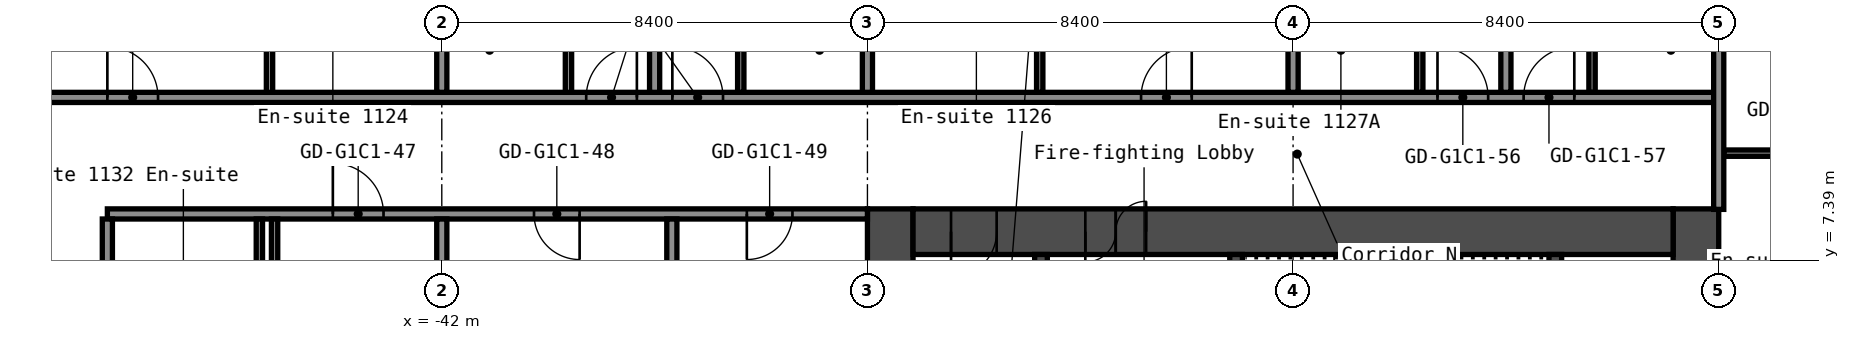
"""IFC4 building model, lengths in metres.
Left out: names, types, materials, properties, quantities, classifications, styles, units other than length and angle.
Written with IfcOpenShell. Run it as: python <this file> out.ifc"""

import sys

from ifc_helpers import new_model, si_unit, direction, frame, frame_2d, origin, place, context, subcontext, project, spatial, rectangle, extrude, element, fill, save


model = new_model("IFC4")
c1 = context("Model", 3, precision=1e-05, world=origin(), true_north=direction((0.0, 1.0)))
c2 = subcontext(c1, "Body", "Model", "MODEL_VIEW")
j1 = project(units=[si_unit("LENGTHUNIT", "METRE"), si_unit("PLANEANGLEUNIT", "RADIAN")], contexts=[c1])
p1 = place(None, origin())
s1 = spatial("IfcSite", under=j1, at=p1, CompositionType="ELEMENT")
p2 = place(p1, origin())
s2 = spatial("IfcBuilding", under=s1, at=p2, CompositionType="ELEMENT")
p3 = place(p2, frame((0.0, 0.0, 42.2)))
s3 = spatial("IfcBuildingStorey", under=s2, at=p3, CompositionType="ELEMENT", Elevation=42.2)
p4 = place(p3, frame((-17.25, -8.4, 0.0), z_axis=(0.0, 0.0, 1.0), x_axis=(0.0, 1.0, 0.0)))
e1 = element("IfcWall", 1, at=p4, inside=s3, PredefinedType="SHEAR", context=c2, shape_type="SweptSolid", body=[
    extrude(rectangle(XDim=16.8, YDim=0.9, at=frame_2d((8.4, 0.0))), origin(), (0.0, 0.0, 1.0), 2.8),
])
p5 = place(p4, frame((12.75, 0.0, 0.0)))
e2 = element("IfcOpeningElement", 2, at=p5, cuts=e1, PredefinedType="OPENING", context=c2, shape_type="SweptSolid", body=[
    extrude(rectangle(XDim=1.2, YDim=2.1, at=frame_2d((0.6, 1.05))), frame((0.0, 0.46, 0.0), z_axis=(0.0, -1.0, 0.0), x_axis=(1.0, 0.0, 0.0)), (0.0, 0.0, 1.0), 0.92),
])
p6 = place(p4, frame((2.85, 0.0, 0.0)))
e3 = element("IfcOpeningElement", 3, at=p6, cuts=e1, PredefinedType="OPENING", context=c2, shape_type="SweptSolid", body=[
    extrude(rectangle(XDim=1.2, YDim=2.1, at=frame_2d((0.6, 1.05))), frame((0.0, 0.46, 0.0), z_axis=(0.0, -1.0, 0.0), x_axis=(1.0, 0.0, 0.0)), (0.0, 0.0, 1.0), 0.92),
])
p7 = place(p3, frame((-33.15, -8.4, 0.0), z_axis=(0.0, 0.0, 1.0), x_axis=(0.0, 1.0, 0.0)))
e4 = element("IfcWall", 4, at=p7, inside=s3, PredefinedType="SHEAR", context=c2, shape_type="SweptSolid", body=[
    extrude(rectangle(XDim=16.8, YDim=0.9, at=frame_2d((8.4, 0.0))), origin(), (0.0, 0.0, 1.0), 2.8),
])
p8 = place(p3, frame((-32.7, 7.95, 0.0), z_axis=(0.0, 0.0, 1.0), x_axis=(1.0, 0.0, 0.0)))
e5 = element("IfcWall", 5, at=p8, inside=s3, PredefinedType="SHEAR", context=c2, shape_type="SweptSolid", body=[
    extrude(rectangle(XDim=15.0, YDim=0.9, at=frame_2d((7.5, 0.0))), origin(), (0.0, 0.0, 1.0), 2.8),
])
p9 = place(p8, frame((3.4, 0.0, 0.0)))
e6 = element("IfcOpeningElement", 6, at=p9, cuts=e5, PredefinedType="OPENING", context=c2, shape_type="SweptSolid", body=[
    extrude(rectangle(XDim=1.2, YDim=2.1, at=frame_2d((0.6, 1.05))), frame((0.0, 0.46, 0.0), z_axis=(0.0, -1.0, 0.0), x_axis=(1.0, 0.0, 0.0)), (0.0, 0.0, 1.0), 0.92),
])
p10 = place(p8, frame((0.75, 0.0, 0.0)))
e7 = element("IfcOpeningElement", 7, at=p10, cuts=e5, PredefinedType="OPENING", context=c2, shape_type="SweptSolid", body=[
    extrude(rectangle(XDim=0.9, YDim=2.1, at=frame_2d((0.45, 1.05))), frame((0.0, 0.46, 0.0), z_axis=(0.0, -1.0, 0.0), x_axis=(1.0, 0.0, 0.0)), (0.0, 0.0, 1.0), 0.92),
])
p11 = place(p3, frame((-20.025, 1.2, 0.0), z_axis=(0.0, 0.0, 1.0), x_axis=(0.0, 1.0, 0.0)))
e8 = element("IfcWall", 8, at=p11, inside=s3, PredefinedType="SHEAR", context=c2, shape_type="SweptSolid", body=[
    extrude(rectangle(XDim=6.3, YDim=0.25, at=frame_2d((3.15, 0.0))), origin(), (0.0, 0.0, 1.0), 2.8),
])
p12 = place(p3, frame((-26.325, 3.75, 0.0), z_axis=(0.0, 0.0, 1.0), x_axis=(0.0, 1.0, 0.0)))
e9 = element("IfcWall", 9, at=p12, inside=s3, PredefinedType="SHEAR", context=c2, shape_type="SweptSolid", body=[
    extrude(rectangle(XDim=3.75, YDim=0.25, at=frame_2d((1.875, 0.0))), origin(), (0.0, 0.0, 1.0), 2.8),
])
p13 = place(p12, frame((1.25, 0.0, 0.0)))
e10 = element("IfcOpeningElement", 10, at=p13, cuts=e9, PredefinedType="OPENING", context=c2, shape_type="SweptSolid", body=[
    extrude(rectangle(XDim=1.2, YDim=2.1, at=frame_2d((0.6, 1.05))), frame((0.0, 0.135, 0.0), z_axis=(0.0, -1.0, 0.0), x_axis=(1.0, 0.0, 0.0)), (0.0, 0.0, 1.0), 0.27),
])
p14 = place(p3, frame((-30.175, 1.45, 0.0), z_axis=(0.0, 0.0, 1.0), x_axis=(0.0, 1.0, 0.0)))
e11 = element("IfcWall", 11, at=p14, inside=s3, PredefinedType="SHEAR", context=c2, shape_type="SweptSolid", body=[
    extrude(rectangle(XDim=6.05, YDim=0.25, at=frame_2d((3.025, 0.0))), origin(), (0.0, 0.0, 1.0), 2.8),
])
p15 = place(p14, frame((2.625, 0.0, 0.0)))
e12 = element("IfcOpeningElement", 12, at=p15, cuts=e11, PredefinedType="OPENING", context=c2, shape_type="SweptSolid", body=[
    extrude(rectangle(XDim=1.1, YDim=2.1, at=frame_2d((0.55, 1.05))), frame((0.0, 0.135, 0.0), z_axis=(0.0, -1.0, 0.0), x_axis=(1.0, 0.0, 0.0)), (0.0, 0.0, 1.0), 0.27),
])
p16 = place(p3, frame((-48.6, 8.3, 0.0), z_axis=(0.0, 0.0, 1.0), x_axis=(1.0, 0.0, 0.0)))
e13 = element("IfcWall", 13, at=p16, inside=s3, PredefinedType="PARTITIONING", context=c2, shape_type="SweptSolid", body=[
    extrude(rectangle(XDim=15.0, YDim=0.2, at=frame_2d((7.5, 0.0))), origin(), (0.0, 0.0, 1.0), 2.8),
])
p17 = place(p16, frame((4.45, 0.0, 0.0)))
e14 = element("IfcOpeningElement", 14, at=p17, cuts=e13, PredefinedType="OPENING", context=c2, shape_type="SweptSolid", body=[
    extrude(rectangle(XDim=1.0, YDim=2.1, at=frame_2d((0.5, 1.05))), frame((0.0, 0.11, 0.0), z_axis=(0.0, -1.0, 0.0), x_axis=(1.0, 0.0, 0.0)), (0.0, 0.0, 1.0), 0.22),
])
p18 = place(p16, frame((8.42, 0.0, 0.0)))
e15 = element("IfcOpeningElement", 15, at=p18, cuts=e13, PredefinedType="OPENING", context=c2, shape_type="SweptSolid", body=[
    extrude(rectangle(XDim=0.9, YDim=2.1, at=frame_2d((0.45, 1.05))), frame((0.0, 0.11, 0.0), z_axis=(0.0, -1.0, 0.0), x_axis=(1.0, 0.0, 0.0)), (0.0, 0.0, 1.0), 0.22),
])
p19 = place(p16, frame((12.62, 0.0, 0.0)))
e16 = element("IfcOpeningElement", 16, at=p19, cuts=e13, PredefinedType="OPENING", context=c2, shape_type="SweptSolid", body=[
    extrude(rectangle(XDim=0.9, YDim=2.1, at=frame_2d((0.45, 1.05))), frame((0.0, 0.11, 0.0), z_axis=(0.0, -1.0, 0.0), x_axis=(1.0, 0.0, 0.0)), (0.0, 0.0, 1.0), 0.22),
])
p20 = place(p3, frame((-16.7, 9.5, 0.0), z_axis=(0.0, 0.0, 1.0), x_axis=(1.0, 0.0, 0.0)))
e17 = element("IfcWall", 17, at=p20, inside=s3, PredefinedType="PARTITIONING", context=c2, shape_type="SweptSolid", body=[
    extrude(rectangle(XDim=3.238, YDim=0.125, at=frame_2d((1.619, 0.0))), origin(), (0.0, 0.0, 1.0), 2.8),
])
p21 = place(p20, frame((1.2, 0.0, 0.0)))
e18 = element("IfcOpeningElement", 18, at=p21, cuts=e17, PredefinedType="OPENING", context=c2, shape_type="SweptSolid", body=[
    extrude(rectangle(XDim=0.8, YDim=2.1, at=frame_2d((0.4, 1.05))), frame((0.0, 0.073, 0.0), z_axis=(0.0, -1.0, 0.0), x_axis=(1.0, 0.0, 0.0)), (0.0, 0.0, 1.0), 0.145),
])
p22 = place(p3, frame((-51.1, 10.6, 0.0), z_axis=(0.0, 0.0, 1.0), x_axis=(1.0, 0.0, 0.0)))
e19 = element("IfcWall", 19, at=p22, inside=s3, PredefinedType="PARTITIONING", context=c2, shape_type="SweptSolid", body=[
    extrude(rectangle(XDim=34.3, YDim=0.2, at=frame_2d((17.15, 0.0))), origin(), (0.0, 0.0, 1.0), 2.8),
])
p23 = place(p22, frame((2.5, 0.0, 0.0)))
e20 = element("IfcOpeningElement", 20, at=p23, cuts=e19, PredefinedType="OPENING", context=c2, shape_type="SweptSolid", body=[
    extrude(rectangle(XDim=1.0, YDim=2.1, at=frame_2d((0.5, 1.05))), frame((0.0, 0.11, 0.0), z_axis=(0.0, -1.0, 0.0), x_axis=(1.0, 0.0, 0.0)), (0.0, 0.0, 1.0), 0.22),
])
p24 = place(p22, frame((11.95, 0.0, 0.0)))
e21 = element("IfcOpeningElement", 21, at=p24, cuts=e19, PredefinedType="OPENING", context=c2, shape_type="SweptSolid", body=[
    extrude(rectangle(XDim=1.0, YDim=2.1, at=frame_2d((0.5, 1.05))), frame((0.0, 0.11, 0.0), z_axis=(0.0, -1.0, 0.0), x_axis=(1.0, 0.0, 0.0)), (0.0, 0.0, 1.0), 0.22),
])
p25 = place(p22, frame((13.65, 0.0, 0.0)))
e22 = element("IfcOpeningElement", 22, at=p25, cuts=e19, PredefinedType="OPENING", context=c2, shape_type="SweptSolid", body=[
    extrude(rectangle(XDim=1.0, YDim=2.1, at=frame_2d((0.5, 1.05))), frame((0.0, 0.11, 0.0), z_axis=(0.0, -1.0, 0.0), x_axis=(1.0, 0.0, 0.0)), (0.0, 0.0, 1.0), 0.22),
])
p26 = place(p22, frame((22.9, 0.0, 0.0)))
e23 = element("IfcOpeningElement", 23, at=p26, cuts=e19, PredefinedType="OPENING", context=c2, shape_type="SweptSolid", body=[
    extrude(rectangle(XDim=1.0, YDim=2.1, at=frame_2d((0.5, 1.05))), frame((0.0, 0.11, 0.0), z_axis=(0.0, -1.0, 0.0), x_axis=(1.0, 0.0, 0.0)), (0.0, 0.0, 1.0), 0.22),
])
p27 = place(p22, frame((28.75, 0.0, 0.0)))
e24 = element("IfcOpeningElement", 24, at=p27, cuts=e19, PredefinedType="OPENING", context=c2, shape_type="SweptSolid", body=[
    extrude(rectangle(XDim=1.0, YDim=2.1, at=frame_2d((0.5, 1.05))), frame((0.0, 0.11, 0.0), z_axis=(0.0, -1.0, 0.0), x_axis=(1.0, 0.0, 0.0)), (0.0, 0.0, 1.0), 0.22),
])
p28 = place(p22, frame((30.45, 0.0, 0.0)))
e25 = element("IfcOpeningElement", 25, at=p28, cuts=e19, PredefinedType="OPENING", context=c2, shape_type="SweptSolid", body=[
    extrude(rectangle(XDim=1.0, YDim=2.1, at=frame_2d((0.5, 1.05))), frame((0.0, 0.11, 0.0), z_axis=(0.0, -1.0, 0.0), x_axis=(1.0, 0.0, 0.0)), (0.0, 0.0, 1.0), 0.22),
])
p29 = place(p3, frame((-48.6, -8.2, 0.0), z_axis=(0.0, 0.0, 1.0), x_axis=(0.0, 1.0, 0.0)))
e26 = element("IfcWall", 26, at=p29, inside=s3, PredefinedType="PARTITIONING", context=c2, shape_type="SweptSolid", body=[
    extrude(rectangle(XDim=16.4, YDim=0.2, at=frame_2d((8.2, 0.0))), origin(), (0.0, 0.0, 1.0), 2.8),
])
p30 = place(p3, frame((-45.6, 5.1, 0.0), z_axis=(0.0, 0.0, 1.0), x_axis=(0.0, 1.0, 0.0)))
e27 = element("IfcWall", 27, at=p30, inside=s3, PredefinedType="PARTITIONING", context=c2, shape_type="SweptSolid", body=[
    extrude(rectangle(XDim=3.1, YDim=0.125, at=frame_2d((1.55, 0.0))), origin(), (0.0, 0.0, 1.0), 2.8),
])
p31 = place(p3, frame((-45.4, 10.7, 0.0), z_axis=(0.0, 0.0, 1.0), x_axis=(0.0, 1.0, 0.0)))
e28 = element("IfcWall", 28, at=p31, inside=s3, PredefinedType="PARTITIONING", context=c2, shape_type="SweptSolid", body=[
    extrude(rectangle(XDim=3.3, YDim=0.125, at=frame_2d((1.65, 0.0))), origin(), (0.0, 0.0, 1.0), 2.8),
])
p32 = place(p3, frame((-45.3, -8.2, 0.0), z_axis=(0.0, 0.0, 1.0), x_axis=(0.0, 1.0, 0.0)))
e29 = element("IfcWall", 29, at=p32, inside=s3, PredefinedType="PARTITIONING", context=c2, shape_type="SweptSolid", body=[
    extrude(rectangle(XDim=16.4, YDim=0.125, at=frame_2d((8.2, 0.0))), origin(), (0.0, 0.0, 1.0), 2.8),
])
p33 = place(p32, frame((4.05, 0.0, 0.0)))
e30 = element("IfcOpeningElement", 30, at=p33, cuts=e29, PredefinedType="OPENING", context=c2, shape_type="SweptSolid", body=[
    extrude(rectangle(XDim=0.9, YDim=2.1, at=frame_2d((0.45, 1.05))), frame((0.0, 0.073, 0.0), z_axis=(0.0, -1.0, 0.0), x_axis=(1.0, 0.0, 0.0)), (0.0, 0.0, 1.0), 0.145),
])
p34 = place(p32, frame((11.45, 0.0, 0.0)))
e31 = element("IfcOpeningElement", 31, at=p34, cuts=e29, PredefinedType="OPENING", context=c2, shape_type="SweptSolid", body=[
    extrude(rectangle(XDim=0.9, YDim=2.1, at=frame_2d((0.45, 1.05))), frame((0.0, 0.073, 0.0), z_axis=(0.0, -1.0, 0.0), x_axis=(1.0, 0.0, 0.0)), (0.0, 0.0, 1.0), 0.145),
])
p35 = place(p3, frame((-42.0, -8.2, 0.0), z_axis=(0.0, 0.0, 1.0), x_axis=(0.0, 1.0, 0.0)))
e32 = element("IfcWall", 32, at=p35, inside=s3, PredefinedType="PARTITIONING", context=c2, shape_type="SweptSolid", body=[
    extrude(rectangle(XDim=16.4, YDim=0.2, at=frame_2d((8.2, 0.0))), origin(), (0.0, 0.0, 1.0), 2.8),
])
p36 = place(p3, frame((-42.0, 10.7, 0.0), z_axis=(0.0, 0.0, 1.0), x_axis=(0.0, 1.0, 0.0)))
e33 = element("IfcWall", 33, at=p36, inside=s3, PredefinedType="PARTITIONING", context=c2, shape_type="SweptSolid", body=[
    extrude(rectangle(XDim=9.6, YDim=0.2, at=frame_2d((4.8, 0.0))), origin(), (0.0, 0.0, 1.0), 2.8),
])
p37 = place(p3, frame((-39.5, 10.7, 0.0), z_axis=(0.0, 0.0, 1.0), x_axis=(0.0, 1.0, 0.0)))
e34 = element("IfcWall", 34, at=p37, inside=s3, PredefinedType="PARTITIONING", context=c2, shape_type="SweptSolid", body=[
    extrude(rectangle(XDim=2.9, YDim=0.125, at=frame_2d((1.45, 0.0))), origin(), (0.0, 0.0, 1.0), 2.8),
])
p38 = place(p37, frame((1.5, 0.0, 0.0)))
e35 = element("IfcOpeningElement", 35, at=p38, cuts=e34, PredefinedType="OPENING", context=c2, shape_type="SweptSolid", body=[
    extrude(rectangle(XDim=0.8, YDim=2.1, at=frame_2d((0.4, 1.05))), frame((0.0, 0.073, 0.0), z_axis=(0.0, -1.0, 0.0), x_axis=(1.0, 0.0, 0.0)), (0.0, 0.0, 1.0), 0.145),
])
p39 = place(p3, frame((-37.8, 10.7, 0.0), z_axis=(0.0, 0.0, 1.0), x_axis=(0.0, 1.0, 0.0)))
e36 = element("IfcWall", 36, at=p39, inside=s3, PredefinedType="PARTITIONING", context=c2, shape_type="SweptSolid", body=[
    extrude(rectangle(XDim=9.6, YDim=0.2, at=frame_2d((4.8, 0.0))), origin(), (0.0, 0.0, 1.0), 2.8),
])
p40 = place(p3, frame((-37.46, 0.0, 0.0), z_axis=(0.0, 0.0, 1.0), x_axis=(0.0, 1.0, 0.0)))
e37 = element("IfcWall", 37, at=p40, inside=s3, PredefinedType="PARTITIONING", context=c2, shape_type="SweptSolid", body=[
    extrude(rectangle(XDim=8.2, YDim=0.2, at=frame_2d((4.1, 0.0))), origin(), (0.0, 0.0, 1.0), 2.8),
])
p41 = place(p3, frame((-36.1, 10.7, 0.0), z_axis=(0.0, 0.0, 1.0), x_axis=(0.0, 1.0, 0.0)))
e38 = element("IfcWall", 38, at=p41, inside=s3, PredefinedType="PARTITIONING", context=c2, shape_type="SweptSolid", body=[
    extrude(rectangle(XDim=2.9, YDim=0.125, at=frame_2d((1.45, 0.0))), origin(), (0.0, 0.0, 1.0), 2.8),
])
p42 = place(p41, frame((1.5, 0.0, 0.0)))
e39 = element("IfcOpeningElement", 39, at=p42, cuts=e38, PredefinedType="OPENING", context=c2, shape_type="SweptSolid", body=[
    extrude(rectangle(XDim=0.8, YDim=2.1, at=frame_2d((0.4, 1.05))), frame((0.0, 0.073, 0.0), z_axis=(0.0, -1.0, 0.0), x_axis=(1.0, 0.0, 0.0)), (0.0, 0.0, 1.0), 0.145),
])
p43 = place(p3, frame((-33.6, 10.7, 0.0), z_axis=(0.0, 0.0, 1.0), x_axis=(0.0, 1.0, 0.0)))
e40 = element("IfcWall", 40, at=p43, inside=s3, PredefinedType="PARTITIONING", context=c2, shape_type="SweptSolid", body=[
    extrude(rectangle(XDim=9.6, YDim=0.2, at=frame_2d((4.8, 0.0))), origin(), (0.0, 0.0, 1.0), 2.8),
])
p44 = place(p3, frame((-30.2, 10.7, 0.0), z_axis=(0.0, 0.0, 1.0), x_axis=(0.0, 1.0, 0.0)))
e41 = element("IfcWall", 41, at=p44, inside=s3, PredefinedType="PARTITIONING", context=c2, shape_type="SweptSolid", body=[
    extrude(rectangle(XDim=3.3, YDim=0.125, at=frame_2d((1.65, 0.0))), origin(), (0.0, 0.0, 1.0), 2.8),
])
p45 = place(p3, frame((-25.2, 10.7, 0.0), z_axis=(0.0, 0.0, 1.0), x_axis=(0.0, 1.0, 0.0)))
e42 = element("IfcWall", 42, at=p45, inside=s3, PredefinedType="PARTITIONING", context=c2, shape_type="SweptSolid", body=[
    extrude(rectangle(XDim=9.6, YDim=0.2, at=frame_2d((4.8, 0.0))), origin(), (0.0, 0.0, 1.0), 2.8),
])
p46 = place(p3, frame((-22.7, 10.7, 0.0), z_axis=(0.0, 0.0, 1.0), x_axis=(0.0, 1.0, 0.0)))
e43 = element("IfcWall", 43, at=p46, inside=s3, PredefinedType="PARTITIONING", context=c2, shape_type="SweptSolid", body=[
    extrude(rectangle(XDim=2.9, YDim=0.125, at=frame_2d((1.45, 0.0))), origin(), (0.0, 0.0, 1.0), 2.8),
])
p47 = place(p46, frame((1.5, 0.0, 0.0)))
e44 = element("IfcOpeningElement", 44, at=p47, cuts=e43, PredefinedType="OPENING", context=c2, shape_type="SweptSolid", body=[
    extrude(rectangle(XDim=0.8, YDim=2.1, at=frame_2d((0.4, 1.05))), frame((0.0, 0.073, 0.0), z_axis=(0.0, -1.0, 0.0), x_axis=(1.0, 0.0, 0.0)), (0.0, 0.0, 1.0), 0.145),
])
p48 = place(p3, frame((-21.0, 10.7, 0.0), z_axis=(0.0, 0.0, 1.0), x_axis=(0.0, 1.0, 0.0)))
e45 = element("IfcWall", 45, at=p48, inside=s3, PredefinedType="PARTITIONING", context=c2, shape_type="SweptSolid", body=[
    extrude(rectangle(XDim=9.6, YDim=0.2, at=frame_2d((4.8, 0.0))), origin(), (0.0, 0.0, 1.0), 2.8),
])
p49 = place(p3, frame((-19.3, 10.7, 0.0), z_axis=(0.0, 0.0, 1.0), x_axis=(0.0, 1.0, 0.0)))
e46 = element("IfcWall", 46, at=p49, inside=s3, PredefinedType="PARTITIONING", context=c2, shape_type="SweptSolid", body=[
    extrude(rectangle(XDim=2.9, YDim=0.125, at=frame_2d((1.45, 0.0))), origin(), (0.0, 0.0, 1.0), 2.8),
])
p50 = place(p49, frame((1.5, 0.0, 0.0)))
e47 = element("IfcOpeningElement", 47, at=p50, cuts=e46, PredefinedType="OPENING", context=c2, shape_type="SweptSolid", body=[
    extrude(rectangle(XDim=0.8, YDim=2.1, at=frame_2d((0.4, 1.05))), frame((0.0, 0.073, 0.0), z_axis=(0.0, -1.0, 0.0), x_axis=(1.0, 0.0, 0.0)), (0.0, 0.0, 1.0), 0.145),
])
p51 = place(p3, frame((-16.8, 8.39, 0.0), z_axis=(0.0, 0.0, 1.0), x_axis=(0.0, 1.0, 0.0)))
e48 = element("IfcWall", 48, at=p51, inside=s3, PredefinedType="PARTITIONING", context=c2, shape_type="SweptSolid", body=[
    extrude(rectangle(XDim=11.91, YDim=0.2, at=frame_2d((5.955, 0.0))), origin(), (0.0, 0.0, 1.0), 2.8),
])
p52 = place(p9, origin())
e49 = element("IfcDoor", 49, at=p52, inside=s3, OperationType="DOUBLE_DOOR_SINGLE_SWING", PredefinedType="DOOR", context=c2, shape_type="SweptSolid", body=[
    extrude(rectangle(XDim=1.2, YDim=2.1, at=frame_2d((0.6, 1.05))), frame((0.0, 0.025, 0.0), z_axis=(0.0, -1.0, 0.0), x_axis=(1.0, 0.0, 0.0)), (0.0, 0.0, 1.0), 0.05),
])
fill(e6, e49)
p53 = place(p10, origin())
e50 = element("IfcDoor", 50, at=p53, inside=s3, OperationType="SINGLE_SWING_LEFT", PredefinedType="DOOR", context=c2, shape_type="SweptSolid", body=[
    extrude(rectangle(XDim=0.9, YDim=2.1, at=frame_2d((0.45, 1.05))), frame((0.0, 0.025, 0.0), z_axis=(0.0, -1.0, 0.0), x_axis=(1.0, 0.0, 0.0)), (0.0, 0.0, 1.0), 0.05),
])
fill(e7, e50)
p54 = place(p17, origin())
e51 = element("IfcDoor", 51, at=p54, inside=s3, OperationType="SINGLE_SWING_RIGHT", PredefinedType="DOOR", context=c2, shape_type="SweptSolid", body=[
    extrude(rectangle(XDim=1.0, YDim=2.1, at=frame_2d((0.5, 1.05))), frame((0.0, 0.025, 0.0), z_axis=(0.0, -1.0, 0.0), x_axis=(1.0, 0.0, 0.0)), (0.0, 0.0, 1.0), 0.05),
])
fill(e14, e51)
p55 = place(p18, origin())
e52 = element("IfcDoor", 52, at=p55, inside=s3, OperationType="SINGLE_SWING_RIGHT", PredefinedType="DOOR", context=c2, shape_type="SweptSolid", body=[
    extrude(rectangle(XDim=0.9, YDim=2.1, at=frame_2d((0.45, 1.05))), frame((0.0, 0.025, 0.0), z_axis=(0.0, -1.0, 0.0), x_axis=(1.0, 0.0, 0.0)), (0.0, 0.0, 1.0), 0.05),
])
fill(e15, e52)
p56 = place(p19, origin())
e53 = element("IfcDoor", 53, at=p56, inside=s3, OperationType="SINGLE_SWING_LEFT", PredefinedType="DOOR", context=c2, shape_type="SweptSolid", body=[
    extrude(rectangle(XDim=0.9, YDim=2.1, at=frame_2d((0.45, 1.05))), frame((0.0, 0.025, 0.0), z_axis=(0.0, -1.0, 0.0), x_axis=(1.0, 0.0, 0.0)), (0.0, 0.0, 1.0), 0.05),
])
fill(e16, e53)
p57 = place(p23, origin())
e54 = element("IfcDoor", 54, at=p57, inside=s3, OperationType="SINGLE_SWING_RIGHT", PredefinedType="DOOR", context=c2, shape_type="SweptSolid", body=[
    extrude(rectangle(XDim=1.0, YDim=2.1, at=frame_2d((0.5, 1.05))), frame((0.0, 0.025, 0.0), z_axis=(0.0, -1.0, 0.0), x_axis=(1.0, 0.0, 0.0)), (0.0, 0.0, 1.0), 0.05),
])
fill(e20, e54)
p58 = place(p24, origin())
e55 = element("IfcDoor", 55, at=p58, inside=s3, OperationType="SINGLE_SWING_LEFT", PredefinedType="DOOR", context=c2, shape_type="SweptSolid", body=[
    extrude(rectangle(XDim=1.0, YDim=2.1, at=frame_2d((0.5, 1.05))), frame((0.0, 0.025, 0.0), z_axis=(0.0, -1.0, 0.0), x_axis=(1.0, 0.0, 0.0)), (0.0, 0.0, 1.0), 0.05),
])
fill(e21, e55)
p59 = place(p25, origin())
e56 = element("IfcDoor", 56, at=p59, inside=s3, OperationType="SINGLE_SWING_RIGHT", PredefinedType="DOOR", context=c2, shape_type="SweptSolid", body=[
    extrude(rectangle(XDim=1.0, YDim=2.1, at=frame_2d((0.5, 1.05))), frame((0.0, 0.025, 0.0), z_axis=(0.0, -1.0, 0.0), x_axis=(1.0, 0.0, 0.0)), (0.0, 0.0, 1.0), 0.05),
])
fill(e22, e56)
p60 = place(p26, origin())
e57 = element("IfcDoor", 57, at=p60, inside=s3, OperationType="SINGLE_SWING_LEFT", PredefinedType="DOOR", context=c2, shape_type="SweptSolid", body=[
    extrude(rectangle(XDim=1.0, YDim=2.1, at=frame_2d((0.5, 1.05))), frame((0.0, 0.025, 0.0), z_axis=(0.0, -1.0, 0.0), x_axis=(1.0, 0.0, 0.0)), (0.0, 0.0, 1.0), 0.05),
])
fill(e23, e57)
p61 = place(p27, origin())
e58 = element("IfcDoor", 58, at=p61, inside=s3, OperationType="SINGLE_SWING_RIGHT", PredefinedType="DOOR", context=c2, shape_type="SweptSolid", body=[
    extrude(rectangle(XDim=1.0, YDim=2.1, at=frame_2d((0.5, 1.05))), frame((0.0, 0.025, 0.0), z_axis=(0.0, -1.0, 0.0), x_axis=(1.0, 0.0, 0.0)), (0.0, 0.0, 1.0), 0.05),
])
fill(e24, e58)
p62 = place(p28, origin())
e59 = element("IfcDoor", 59, at=p62, inside=s3, OperationType="SINGLE_SWING_LEFT", PredefinedType="DOOR", context=c2, shape_type="SweptSolid", body=[
    extrude(rectangle(XDim=1.0, YDim=2.1, at=frame_2d((0.5, 1.05))), frame((0.0, 0.025, 0.0), z_axis=(0.0, -1.0, 0.0), x_axis=(1.0, 0.0, 0.0)), (0.0, 0.0, 1.0), 0.05),
])
fill(e25, e59)
save(model, sys.argv[1])
